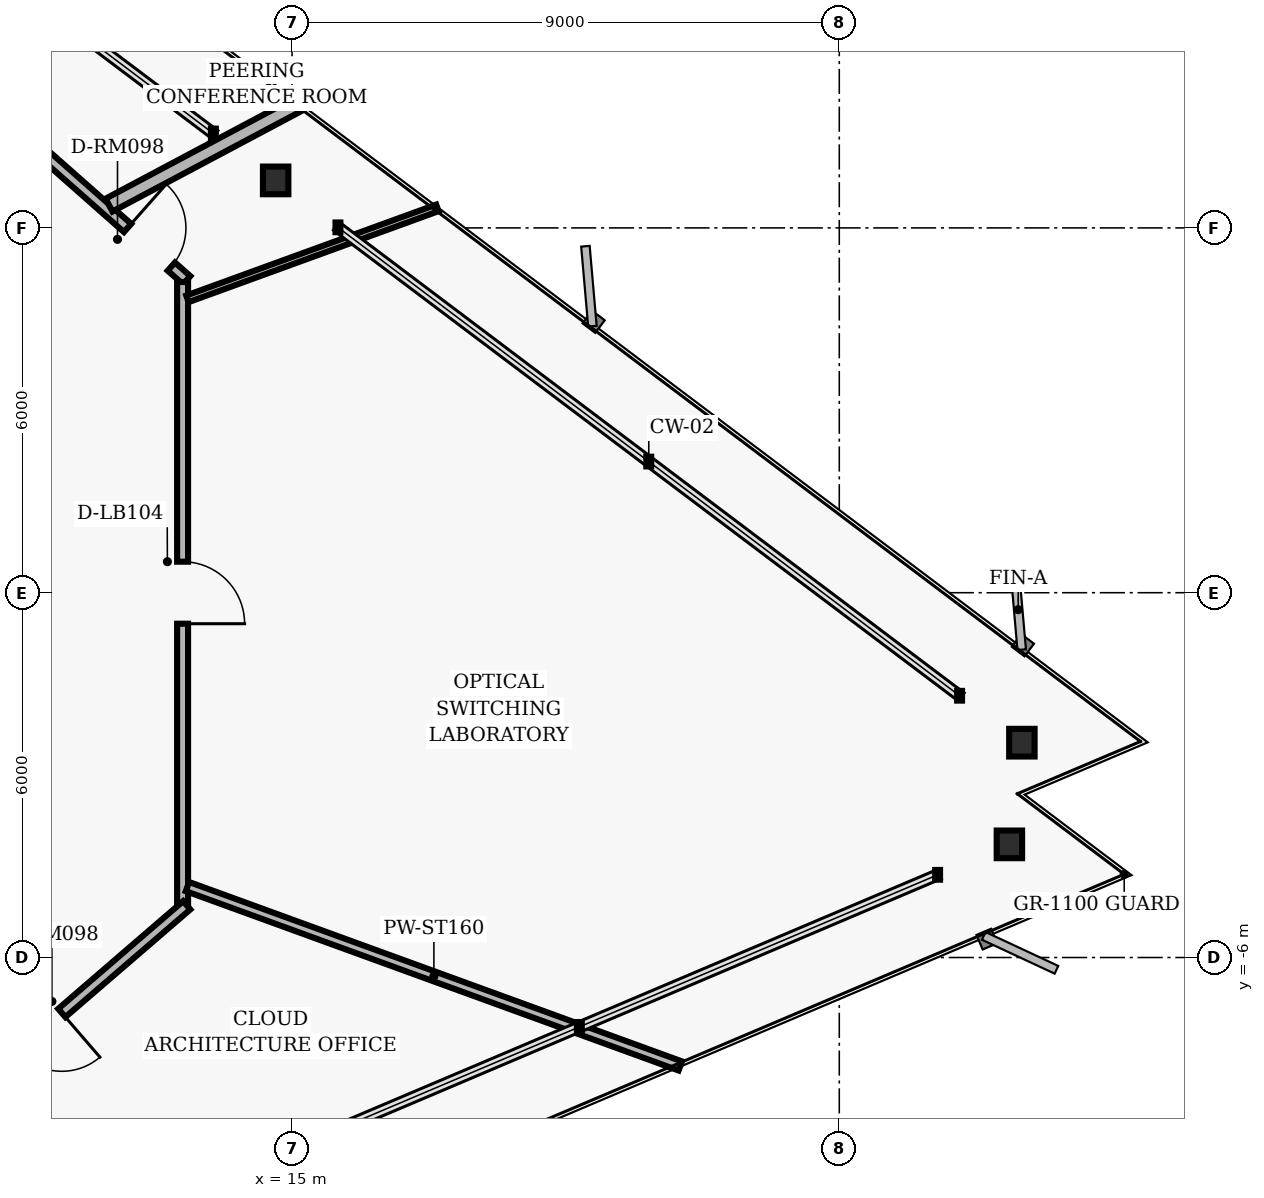
"""IFC4 building model, lengths in metres.
Left out: names, types, materials, properties, quantities, classifications, styles, units other than length and angle.
Written with IfcOpenShell. Run it as: python <this file> out.ifc"""

import sys

from ifc_helpers import new_model, si_unit, direction, frame, frame_2d, origin, origin_2d, place, context, subcontext, project, spatial, rectangle, i_section, extrude, element, fill, save


model = new_model("IFC4")
c1 = context("Model", 3, precision=1e-05, world=origin(), true_north=direction((0.0, 1.0)))
c2 = subcontext(c1, "Body", "Model", "MODEL_VIEW")
j1 = project(units=[si_unit("LENGTHUNIT", "METRE"), si_unit("PLANEANGLEUNIT", "RADIAN")], contexts=[c1])
p1 = place(None, origin())
s1 = spatial("IfcSite", under=j1, at=p1, CompositionType="ELEMENT")
p2 = place(p1, origin())
s2 = spatial("IfcBuilding", under=s1, at=p2, CompositionType="ELEMENT")
p3 = place(p2, frame((0.0, 0.0, 73.12)))
s3 = spatial("IfcBuildingStorey", under=s2, at=p3, CompositionType="ELEMENT", Elevation=73.12)
for number, where, z_axis, x_axis in (
    (1, (27.003, -2.467, 0.0), (0.0, 0.0, 1.0), (1.0, 0.0, 0.0)),
    (2, (14.73, 6.781, 0.0), (0.0, 0.0, 1.0), (1.0, 0.0, 0.0)),
    (3, (26.798, -4.139, 0.0), (0.0, 0.0, 1.0), (1.0, 0.0, 0.0)),
):
    element("IfcColumn", number, at=place(p3, frame(where, z_axis=z_axis, x_axis=x_axis)), inside=s3, PredefinedType="COLUMN", context=c2, shape_type="SweptSolid", body=[
        extrude(i_section(OverallWidth=0.418, OverallDepth=0.455, WebThickness=0.042, FlangeThickness=0.068, FilletRadius=0.025, at=origin_2d()), origin(), (0.0, 0.0, 1.0), 3.36),
    ])
p4 = place(p3, frame((8.567, 9.29, 0.0), z_axis=(0.0, 0.0, 1.0), x_axis=(0.749626463267, -0.66186113768, 0.0)))
e4 = element("IfcWall", 4, at=p4, inside=s3, PredefinedType="PARTITIONING", context=c2, shape_type="SweptSolid", body=[
    extrude(rectangle(XDim=6.27, YDim=0.18, at=frame_2d((3.135, 0.0))), origin(), (0.0, 0.0, 1.0), 2.427),
])
p5 = place(p4, frame((4.972, 0.0, 0.0)))
e5 = element("IfcOpeningElement", 5, at=p5, cuts=e4, PredefinedType="OPENING", context=c2, shape_type="SweptSolid", body=[
    extrude(rectangle(XDim=0.96, YDim=2.02, at=frame_2d((0.48, 1.01))), frame((0.0, 0.1, 0.0), z_axis=(0.0, -1.0, 0.0), x_axis=(1.0, 0.0, 0.0)), (0.0, 0.0, 1.0), 0.2),
])
p6 = place(p3, frame((13.2, 5.11, 0.0), z_axis=(0.0, 0.0, 1.0), x_axis=(0.0, -1.0, 0.0)))
e6 = element("IfcWall", 6, at=p6, inside=s3, PredefinedType="PARTITIONING", context=c2, shape_type="SweptSolid", body=[
    extrude(rectangle(XDim=10.22, YDim=0.18, at=frame_2d((5.11, 0.0))), origin(), (0.0, 0.0, 1.0), 2.913),
])
p7 = place(p6, frame((4.6, 0.0, 0.0)))
e7 = element("IfcOpeningElement", 7, at=p7, cuts=e6, PredefinedType="OPENING", context=c2, shape_type="SweptSolid", body=[
    extrude(rectangle(XDim=1.02, YDim=2.02, at=frame_2d((0.51, 1.01))), frame((0.0, 0.1, 0.0), z_axis=(0.0, -1.0, 0.0), x_axis=(1.0, 0.0, 0.0)), (0.0, 0.0, 1.0), 0.2),
])
p8 = place(p3, frame((13.268, -5.141, 0.0), z_axis=(0.0, 0.0, 1.0), x_axis=(-0.757534501725, -0.65279512766, 0.0)))
e8 = element("IfcWall", 8, at=p8, inside=s3, PredefinedType="PARTITIONING", context=c2, shape_type="SweptSolid", body=[
    extrude(rectangle(XDim=6.385, YDim=0.18, at=frame_2d((3.192, 0.0))), origin(), (0.0, 0.0, 1.0), 2.913),
])
p9 = place(p8, frame((2.712, 0.0, 0.0)))
e9 = element("IfcOpeningElement", 9, at=p9, cuts=e8, PredefinedType="OPENING", context=c2, shape_type="SweptSolid", body=[
    extrude(rectangle(XDim=0.96, YDim=2.02, at=frame_2d((0.48, 1.01))), frame((0.0, 0.1, 0.0), z_axis=(0.0, -1.0, 0.0), x_axis=(1.0, 0.0, 0.0)), (0.0, 0.0, 1.0), 0.2),
])
p10 = place(p3, frame((13.28, -4.833, 0.0), z_axis=(0.0, 0.0, 1.0), x_axis=(0.939687597414, -0.342033944611, 0.0)))
e10 = element("IfcWall", 10, at=p10, inside=s3, PredefinedType="PARTITIONING", context=c2, shape_type="SweptSolid", body=[
    extrude(rectangle(XDim=8.625, YDim=0.16, at=frame_2d((4.313, 0.0))), origin(), (0.0, 0.0, 1.0), 2.913),
])
p11 = place(p3, frame((13.28, 4.833, 0.0), z_axis=(0.0, 0.0, 1.0), x_axis=(0.939689084441, 0.342029859198, 0.0)))
e11 = element("IfcWall", 11, at=p11, inside=s3, PredefinedType="MOVABLE", context=c2, shape_type="SweptSolid", body=[
    extrude(rectangle(XDim=4.374, YDim=0.115, at=frame_2d((2.187, 0.0))), origin(), (0.0, 0.0, 1.0), 2.913),
])
p12 = place(p3, frame((11.99, 6.375, 0.0), z_axis=(0.0, 0.0, 1.0), x_axis=(0.882950733712, 0.469465655654, 0.0)))
e12 = element("IfcWall", 12, at=p12, inside=s3, PredefinedType="PARTITIONING", context=c2, shape_type="SweptSolid", body=[
    extrude(rectangle(XDim=3.546, YDim=0.24, at=frame_2d((1.773, 0.0))), origin(), (0.0, 0.0, 1.0), 2.913),
])
p13 = place(p9, origin())
e13 = element("IfcDoor", 13, at=p13, inside=s3, OperationType="SINGLE_SWING_LEFT", PredefinedType="DOOR", context=c2, shape_type="SweptSolid", body=[
    extrude(rectangle(XDim=0.96, YDim=2.02, at=frame_2d((0.48, 1.01))), frame((0.0, 0.025, 0.0), z_axis=(0.0, -1.0, 0.0), x_axis=(1.0, 0.0, 0.0)), (0.0, 0.0, 1.0), 0.05),
])
fill(e9, e13)
p14 = place(p7, origin())
e14 = element("IfcDoor", 14, at=p14, inside=s3, OperationType="SINGLE_SWING_RIGHT", PredefinedType="DOOR", context=c2, shape_type="SweptSolid", body=[
    extrude(rectangle(XDim=1.02, YDim=2.02, at=frame_2d((0.51, 1.01))), frame((0.0, 0.025, 0.0), z_axis=(0.0, -1.0, 0.0), x_axis=(1.0, 0.0, 0.0)), (0.0, 0.0, 1.0), 0.05),
])
fill(e7, e14)
p15 = place(p5, origin())
e15 = element("IfcDoor", 15, at=p15, inside=s3, OperationType="SINGLE_SWING_LEFT", PredefinedType="DOOR", context=c2, shape_type="SweptSolid", body=[
    extrude(rectangle(XDim=0.96, YDim=2.02, at=frame_2d((0.48, 1.01))), frame((0.0, 0.025, 0.0), z_axis=(0.0, -1.0, 0.0), x_axis=(1.0, 0.0, 0.0)), (0.0, 0.0, 1.0), 0.05),
])
fill(e5, e15)
save(model, sys.argv[1])
